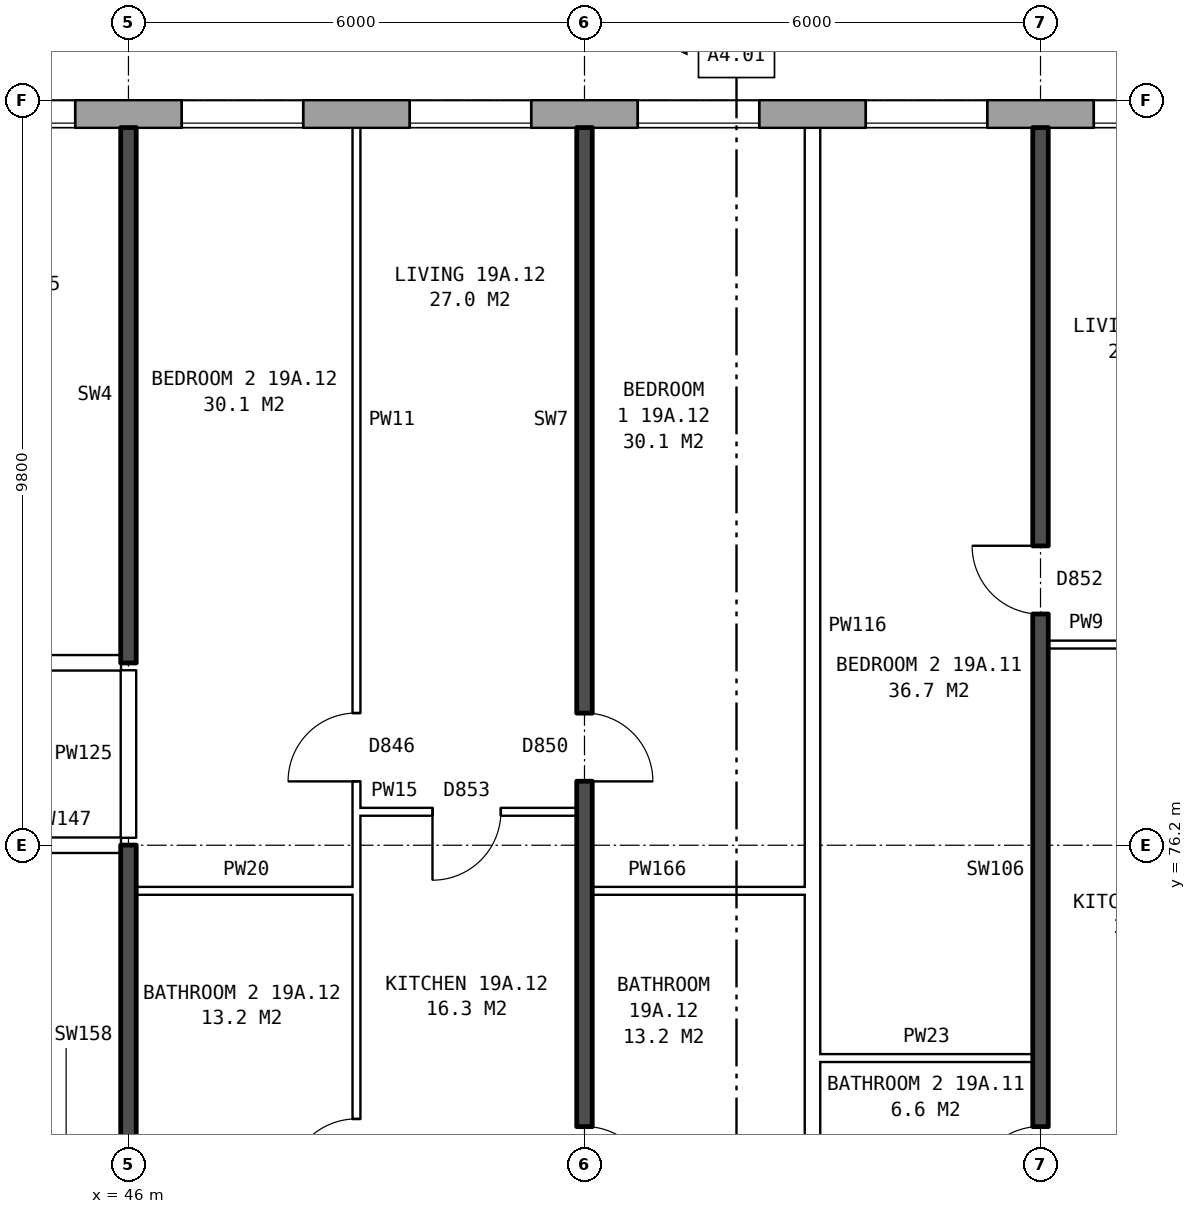
"""IFC4 building model, lengths in metres.
Left out: names, types, materials, properties, quantities, classifications, styles, units other than length and angle.
Written with IfcOpenShell. Run it as: python <this file> out.ifc"""

import sys

from ifc_helpers import new_model, si_unit, direction, frame, frame_2d, origin, place, context, subcontext, project, spatial, rectangle, extrude, element, fill, save


model = new_model("IFC4")
c1 = context("Model", 3, precision=1e-05, world=origin(), true_north=direction((0.0, 1.0)))
c2 = subcontext(c1, "Body", "Model", "MODEL_VIEW")
j1 = project(units=[si_unit("LENGTHUNIT", "METRE"), si_unit("PLANEANGLEUNIT", "RADIAN")], contexts=[c1])
p1 = place(None, origin())
s1 = spatial("IfcSite", under=j1, at=p1, CompositionType="ELEMENT")
p2 = place(p1, origin())
s2 = spatial("IfcBuilding", under=s1, at=p2, CompositionType="ELEMENT")
p3 = place(p2, frame((0.0, 0.0, 71.6)))
s3 = spatial("IfcBuildingStorey", under=s2, at=p3, CompositionType="ELEMENT", Elevation=71.6)
p4 = place(p3, frame((72.925, 85.82, 0.0), z_axis=(0.0, 0.0, 1.0), x_axis=(-1.0, 0.0, 0.0)))
e1 = element("IfcWall", 1, at=p4, inside=s3, PredefinedType="STANDARD", context=c2, shape_type="SweptSolid", body=[
    extrude(rectangle(XDim=46.601, YDim=0.36, at=frame_2d((23.3, 0.0))), origin(), (0.0, 0.0, 1.0), 2.85),
])
p5 = place(p4, frame((0.625, 0.0, 0.8)))
e2 = element("IfcOpeningElement", 2, at=p5, cuts=e1, PredefinedType="OPENING", context=c2, shape_type="SweptSolid", body=[
    extrude(rectangle(XDim=1.6, YDim=1.8, at=frame_2d((0.8, 0.9))), frame((0.0, 0.19, 0.0), z_axis=(0.0, -1.0, 0.0), x_axis=(1.0, 0.0, 0.0)), (0.0, 0.0, 1.0), 0.38),
])
p6 = place(p4, frame((4.625, 0.0, 0.8)))
e3 = element("IfcOpeningElement", 3, at=p6, cuts=e1, PredefinedType="OPENING", context=c2, shape_type="SweptSolid", body=[
    extrude(rectangle(XDim=0.8, YDim=0.9, at=frame_2d((0.4, 0.45))), frame((0.0, 0.19, 0.0), z_axis=(0.0, -1.0, 0.0), x_axis=(1.0, 0.0, 0.0)), (0.0, 0.0, 1.0), 0.38),
])
p7 = place(p4, frame((6.625, 0.0, 0.8)))
e4 = element("IfcOpeningElement", 4, at=p7, cuts=e1, PredefinedType="OPENING", context=c2, shape_type="SweptSolid", body=[
    extrude(rectangle(XDim=1.6, YDim=1.8, at=frame_2d((0.8, 0.9))), frame((0.0, 0.19, 0.0), z_axis=(0.0, -1.0, 0.0), x_axis=(1.0, 0.0, 0.0)), (0.0, 0.0, 1.0), 0.38),
])
p8 = place(p4, frame((9.625, 0.0, 0.8)))
e5 = element("IfcOpeningElement", 5, at=p8, cuts=e1, PredefinedType="OPENING", context=c2, shape_type="SweptSolid", body=[
    extrude(rectangle(XDim=1.6, YDim=1.8, at=frame_2d((0.8, 0.9))), frame((0.0, 0.19, 0.0), z_axis=(0.0, -1.0, 0.0), x_axis=(1.0, 0.0, 0.0)), (0.0, 0.0, 1.0), 0.38),
])
p9 = place(p4, frame((12.625, 0.0, 0.8)))
e6 = element("IfcOpeningElement", 6, at=p9, cuts=e1, PredefinedType="OPENING", context=c2, shape_type="SweptSolid", body=[
    extrude(rectangle(XDim=1.6, YDim=1.8, at=frame_2d((0.8, 0.9))), frame((0.0, 0.19, 0.0), z_axis=(0.0, -1.0, 0.0), x_axis=(1.0, 0.0, 0.0)), (0.0, 0.0, 1.0), 0.38),
])
p10 = place(p4, frame((15.625, 0.0, 0.8)))
e7 = element("IfcOpeningElement", 7, at=p10, cuts=e1, PredefinedType="OPENING", context=c2, shape_type="SweptSolid", body=[
    extrude(rectangle(XDim=1.6, YDim=1.8, at=frame_2d((0.8, 0.9))), frame((0.0, 0.19, 0.0), z_axis=(0.0, -1.0, 0.0), x_axis=(1.0, 0.0, 0.0)), (0.0, 0.0, 1.0), 0.38),
])
p11 = place(p4, frame((18.625, 0.0, 0.8)))
e8 = element("IfcOpeningElement", 8, at=p11, cuts=e1, PredefinedType="OPENING", context=c2, shape_type="SweptSolid", body=[
    extrude(rectangle(XDim=1.6, YDim=1.8, at=frame_2d((0.8, 0.9))), frame((0.0, 0.19, 0.0), z_axis=(0.0, -1.0, 0.0), x_axis=(1.0, 0.0, 0.0)), (0.0, 0.0, 1.0), 0.38),
])
p12 = place(p4, frame((21.625, 0.0, 0.8)))
e9 = element("IfcOpeningElement", 9, at=p12, cuts=e1, PredefinedType="OPENING", context=c2, shape_type="SweptSolid", body=[
    extrude(rectangle(XDim=1.6, YDim=1.8, at=frame_2d((0.8, 0.9))), frame((0.0, 0.19, 0.0), z_axis=(0.0, -1.0, 0.0), x_axis=(1.0, 0.0, 0.0)), (0.0, 0.0, 1.0), 0.38),
])
p13 = place(p4, frame((24.625, 0.0, 0.8)))
e10 = element("IfcOpeningElement", 10, at=p13, cuts=e1, PredefinedType="OPENING", context=c2, shape_type="SweptSolid", body=[
    extrude(rectangle(XDim=1.6, YDim=1.8, at=frame_2d((0.8, 0.9))), frame((0.0, 0.19, 0.0), z_axis=(0.0, -1.0, 0.0), x_axis=(1.0, 0.0, 0.0)), (0.0, 0.0, 1.0), 0.38),
])
p14 = place(p4, frame((27.625, 0.0, 0.8)))
e11 = element("IfcOpeningElement", 11, at=p14, cuts=e1, PredefinedType="OPENING", context=c2, shape_type="SweptSolid", body=[
    extrude(rectangle(XDim=1.6, YDim=1.8, at=frame_2d((0.8, 0.9))), frame((0.0, 0.19, 0.0), z_axis=(0.0, -1.0, 0.0), x_axis=(1.0, 0.0, 0.0)), (0.0, 0.0, 1.0), 0.38),
])
p15 = place(p4, frame((30.625, 0.0, 0.8)))
e12 = element("IfcOpeningElement", 12, at=p15, cuts=e1, PredefinedType="OPENING", context=c2, shape_type="SweptSolid", body=[
    extrude(rectangle(XDim=1.6, YDim=1.8, at=frame_2d((0.8, 0.9))), frame((0.0, 0.19, 0.0), z_axis=(0.0, -1.0, 0.0), x_axis=(1.0, 0.0, 0.0)), (0.0, 0.0, 1.0), 0.38),
])
p16 = place(p4, frame((33.625, 0.0, 0.8)))
e13 = element("IfcOpeningElement", 13, at=p16, cuts=e1, PredefinedType="OPENING", context=c2, shape_type="SweptSolid", body=[
    extrude(rectangle(XDim=1.6, YDim=1.8, at=frame_2d((0.8, 0.9))), frame((0.0, 0.19, 0.0), z_axis=(0.0, -1.0, 0.0), x_axis=(1.0, 0.0, 0.0)), (0.0, 0.0, 1.0), 0.38),
])
p17 = place(p4, frame((36.625, 0.0, 0.8)))
e14 = element("IfcOpeningElement", 14, at=p17, cuts=e1, PredefinedType="OPENING", context=c2, shape_type="SweptSolid", body=[
    extrude(rectangle(XDim=1.6, YDim=1.8, at=frame_2d((0.8, 0.9))), frame((0.0, 0.19, 0.0), z_axis=(0.0, -1.0, 0.0), x_axis=(1.0, 0.0, 0.0)), (0.0, 0.0, 1.0), 0.38),
])
p18 = place(p4, frame((39.625, 0.0, 0.8)))
e15 = element("IfcOpeningElement", 15, at=p18, cuts=e1, PredefinedType="OPENING", context=c2, shape_type="SweptSolid", body=[
    extrude(rectangle(XDim=1.6, YDim=1.8, at=frame_2d((0.8, 0.9))), frame((0.0, 0.19, 0.0), z_axis=(0.0, -1.0, 0.0), x_axis=(1.0, 0.0, 0.0)), (0.0, 0.0, 1.0), 0.38),
])
p19 = place(p4, frame((43.225, 0.0, 1.7)))
e16 = element("IfcOpeningElement", 16, at=p19, cuts=e1, PredefinedType="OPENING", context=c2, shape_type="SweptSolid", body=[
    extrude(rectangle(XDim=0.6, YDim=0.9, at=frame_2d((0.3, 0.45))), frame((0.0, 0.19, 0.0), z_axis=(0.0, -1.0, 0.0), x_axis=(1.0, 0.0, 0.0)), (0.0, 0.0, 1.0), 0.38),
])
p20 = place(p4, frame((5.725, 0.0, 0.8)))
e17 = element("IfcOpeningElement", 17, at=p20, cuts=e1, PredefinedType="OPENING", context=c2, shape_type="SweptSolid", body=[
    extrude(rectangle(XDim=0.6, YDim=1.8, at=frame_2d((0.3, 0.9))), frame((0.0, 0.19, 0.0), z_axis=(0.0, -1.0, 0.0), x_axis=(1.0, 0.0, 0.0)), (0.0, 0.0, 1.0), 0.38),
])
p21 = place(p4, frame((44.125, 0.0, 1.0)))
e18 = element("IfcOpeningElement", 18, at=p21, cuts=e1, PredefinedType="OPENING", context=c2, shape_type="SweptSolid", body=[
    extrude(rectangle(XDim=0.6, YDim=1.5, at=frame_2d((0.3, 0.75))), frame((0.0, 0.19, 0.0), z_axis=(0.0, -1.0, 0.0), x_axis=(1.0, 0.0, 0.0)), (0.0, 0.0, 1.0), 0.38),
])
p22 = place(p3, frame((55.1, 73.4, 0.0), z_axis=(0.0, 0.0, 1.0), x_axis=(1.0, 0.0, 0.0)))
e19 = element("IfcWall", 19, at=p22, inside=s3, PredefinedType="PARTITIONING", context=c2, shape_type="SweptSolid", body=[
    extrude(rectangle(XDim=2.8, YDim=0.1, at=frame_2d((1.4, 0.0))), origin(), (0.0, 0.0, 1.0), 2.85),
])
p23 = place(p3, frame((46.1, 75.6, 0.0), z_axis=(0.0, 0.0, 1.0), x_axis=(1.0, 0.0, 0.0)))
e20 = element("IfcWall", 20, at=p23, inside=s3, PredefinedType="PARTITIONING", context=c2, shape_type="SweptSolid", body=[
    extrude(rectangle(XDim=2.9, YDim=0.1, at=frame_2d((1.45, 0.0))), origin(), (0.0, 0.0, 1.0), 2.85),
])
p24 = place(p3, frame((52.1, 75.6, 0.0), z_axis=(0.0, 0.0, 1.0), x_axis=(1.0, 0.0, 0.0)))
e21 = element("IfcWall", 21, at=p24, inside=s3, PredefinedType="PARTITIONING", context=c2, shape_type="SweptSolid", body=[
    extrude(rectangle(XDim=2.8, YDim=0.1, at=frame_2d((1.4, 0.0))), origin(), (0.0, 0.0, 1.0), 2.85),
])
p25 = place(p3, frame((44.36, 76.2, 0.0), z_axis=(0.0, 0.0, 1.0), x_axis=(1.0, 0.0, 0.0)))
e22 = element("IfcWall", 22, at=p25, inside=s3, PredefinedType="PARTITIONING", context=c2, shape_type="SweptSolid", body=[
    extrude(rectangle(XDim=1.54, YDim=0.2, at=frame_2d((0.77, 0.0))), origin(), (0.0, 0.0, 1.0), 2.85),
])
p26 = place(p3, frame((49.0, 76.64, 0.0), z_axis=(0.0, 0.0, 1.0), x_axis=(1.0, 0.0, 0.0)))
e23 = element("IfcWall", 23, at=p26, inside=s3, PredefinedType="PARTITIONING", context=c2, shape_type="SweptSolid", body=[
    extrude(rectangle(XDim=2.9, YDim=0.1, at=frame_2d((1.45, 0.0))), origin(), (0.0, 0.0, 1.0), 2.85),
])
p27 = place(p26, frame((1.0, 0.0, 0.0)))
e24 = element("IfcOpeningElement", 24, at=p27, cuts=e23, PredefinedType="OPENING", context=c2, shape_type="SweptSolid", body=[
    extrude(rectangle(XDim=0.9, YDim=2.1, at=frame_2d((0.45, 1.05))), frame((0.0, 0.06, 0.0), z_axis=(0.0, -1.0, 0.0), x_axis=(1.0, 0.0, 0.0)), (0.0, 0.0, 1.0), 0.12),
])
p28 = place(p3, frame((23.61, 78.6, 0.0), z_axis=(0.0, 0.0, 1.0), x_axis=(1.0, 0.0, 0.0)))
e25 = element("IfcWall", 25, at=p28, inside=s3, PredefinedType="PARTITIONING", context=c2, shape_type="SweptSolid", body=[
    extrude(rectangle(XDim=22.29, YDim=0.2, at=frame_2d((11.145, 0.0))), origin(), (0.0, 0.0, 1.0), 2.85),
])
p29 = place(p28, frame((18.84, 0.0, 0.0)))
e26 = element("IfcOpeningElement", 26, at=p29, cuts=e25, PredefinedType="OPENING", context=c2, shape_type="SweptSolid", body=[
    extrude(rectangle(XDim=1.0, YDim=2.1, at=frame_2d((0.5, 1.05))), frame((0.0, 0.11, 0.0), z_axis=(0.0, -1.0, 0.0), x_axis=(1.0, 0.0, 0.0)), (0.0, 0.0, 1.0), 0.22),
])
p30 = place(p28, frame((6.89, 0.0, 0.0)))
e27 = element("IfcOpeningElement", 27, at=p30, cuts=e25, PredefinedType="OPENING", context=c2, shape_type="SweptSolid", body=[
    extrude(rectangle(XDim=1.0, YDim=2.1, at=frame_2d((0.5, 1.05))), frame((0.0, 0.11, 0.0), z_axis=(0.0, -1.0, 0.0), x_axis=(1.0, 0.0, 0.0)), (0.0, 0.0, 1.0), 0.22),
])
p31 = place(p3, frame((58.1, 78.84, 0.0), z_axis=(0.0, 0.0, 1.0), x_axis=(1.0, 0.0, 0.0)))
e28 = element("IfcWall", 28, at=p31, inside=s3, PredefinedType="PARTITIONING", context=c2, shape_type="SweptSolid", body=[
    extrude(rectangle(XDim=2.9, YDim=0.1, at=frame_2d((1.45, 0.0))), origin(), (0.0, 0.0, 1.0), 2.85),
])
p32 = place(p31, frame((1.0, 0.0, 0.0)))
e29 = element("IfcOpeningElement", 29, at=p32, cuts=e28, PredefinedType="OPENING", context=c2, shape_type="SweptSolid", body=[
    extrude(rectangle(XDim=0.9, YDim=2.1, at=frame_2d((0.45, 1.05))), frame((0.0, 0.06, 0.0), z_axis=(0.0, -1.0, 0.0), x_axis=(1.0, 0.0, 0.0)), (0.0, 0.0, 1.0), 0.12),
])
p33 = place(p3, frame((46.0, 71.2, 0.0), z_axis=(0.0, 0.0, 1.0), x_axis=(0.0, 1.0, 0.0)))
e30 = element("IfcWall", 30, at=p33, inside=s3, PredefinedType="SOLIDWALL", context=c2, shape_type="SweptSolid", body=[
    extrude(rectangle(XDim=5.0, YDim=0.2, at=frame_2d((2.5, 0.0))), origin(), (0.0, 0.0, 1.0), 2.85),
])
p34 = place(p3, frame((46.0, 76.3, 0.0), z_axis=(0.0, 0.0, 1.0), x_axis=(0.0, 1.0, 0.0)))
e31 = element("IfcWall", 31, at=p34, inside=s3, PredefinedType="PARTITIONING", context=c2, shape_type="SweptSolid", body=[
    extrude(rectangle(XDim=2.2, YDim=0.2, at=frame_2d((1.1, 0.0))), origin(), (0.0, 0.0, 1.0), 2.85),
])
p35 = place(p3, frame((46.0, 78.6, 0.0), z_axis=(0.0, 0.0, 1.0), x_axis=(0.0, 1.0, 0.0)))
e32 = element("IfcWall", 32, at=p35, inside=s3, PredefinedType="SOLIDWALL", context=c2, shape_type="SweptSolid", body=[
    extrude(rectangle(XDim=7.04, YDim=0.2, at=frame_2d((3.52, 0.0))), origin(), (0.0, 0.0, 1.0), 2.85),
])
p36 = place(p3, frame((49.0, 71.3, 0.0), z_axis=(0.0, 0.0, 1.0), x_axis=(0.0, 1.0, 0.0)))
e33 = element("IfcWall", 33, at=p36, inside=s3, PredefinedType="PARTITIONING", context=c2, shape_type="SweptSolid", body=[
    extrude(rectangle(XDim=14.34, YDim=0.1, at=frame_2d((7.17, 0.0))), origin(), (0.0, 0.0, 1.0), 2.85),
])
p37 = place(p36, frame((5.74, 0.0, 0.0)))
e34 = element("IfcOpeningElement", 34, at=p37, cuts=e33, PredefinedType="OPENING", context=c2, shape_type="SweptSolid", body=[
    extrude(rectangle(XDim=0.9, YDim=2.1, at=frame_2d((0.45, 1.05))), frame((0.0, 0.06, 0.0), z_axis=(0.0, -1.0, 0.0), x_axis=(1.0, 0.0, 0.0)), (0.0, 0.0, 1.0), 0.12),
])
p38 = place(p36, frame((0.4, 0.0, 0.0)))
e35 = element("IfcOpeningElement", 35, at=p38, cuts=e33, PredefinedType="OPENING", context=c2, shape_type="SweptSolid", body=[
    extrude(rectangle(XDim=0.9, YDim=2.1, at=frame_2d((0.45, 1.05))), frame((0.0, 0.06, 0.0), z_axis=(0.0, -1.0, 0.0), x_axis=(1.0, 0.0, 0.0)), (0.0, 0.0, 1.0), 0.12),
])
p39 = place(p3, frame((52.0, 71.2, 0.0), z_axis=(0.0, 0.0, 1.0), x_axis=(0.0, 1.0, 0.0)))
e36 = element("IfcWall", 36, at=p39, inside=s3, PredefinedType="SOLIDWALL", context=c2, shape_type="SweptSolid", body=[
    extrude(rectangle(XDim=14.44, YDim=0.2, at=frame_2d((7.22, 0.0))), origin(), (0.0, 0.0, 1.0), 2.85),
])
p40 = place(p39, frame((5.84, 0.0, 0.0)))
e37 = element("IfcOpeningElement", 37, at=p40, cuts=e36, PredefinedType="OPENING", context=c2, shape_type="SweptSolid", body=[
    extrude(rectangle(XDim=0.9, YDim=2.1, at=frame_2d((0.45, 1.05))), frame((0.0, 0.11, 0.0), z_axis=(0.0, -1.0, 0.0), x_axis=(1.0, 0.0, 0.0)), (0.0, 0.0, 1.0), 0.22),
])
p41 = place(p39, frame((0.4, 0.0, 0.0)))
e38 = element("IfcOpeningElement", 38, at=p41, cuts=e36, PredefinedType="OPENING", context=c2, shape_type="SweptSolid", body=[
    extrude(rectangle(XDim=0.9, YDim=2.1, at=frame_2d((0.45, 1.05))), frame((0.0, 0.11, 0.0), z_axis=(0.0, -1.0, 0.0), x_axis=(1.0, 0.0, 0.0)), (0.0, 0.0, 1.0), 0.22),
])
p42 = place(p3, frame((55.0, 71.3, 0.0), z_axis=(0.0, 0.0, 1.0), x_axis=(0.0, 1.0, 0.0)))
e39 = element("IfcWall", 39, at=p42, inside=s3, PredefinedType="PARTITIONING", context=c2, shape_type="SweptSolid", body=[
    extrude(rectangle(XDim=14.34, YDim=0.2, at=frame_2d((7.17, 0.0))), origin(), (0.0, 0.0, 1.0), 2.85),
])
p43 = place(p3, frame((58.0, 71.2, 0.0), z_axis=(0.0, 0.0, 1.0), x_axis=(0.0, 1.0, 0.0)))
e40 = element("IfcWall", 40, at=p43, inside=s3, PredefinedType="SOLIDWALL", context=c2, shape_type="SweptSolid", body=[
    extrude(rectangle(XDim=14.44, YDim=0.2, at=frame_2d((7.22, 0.0))), origin(), (0.0, 0.0, 1.0), 2.85),
])
p44 = place(p43, frame((8.04, 0.0, 0.0)))
e41 = element("IfcOpeningElement", 41, at=p44, cuts=e40, PredefinedType="OPENING", context=c2, shape_type="SweptSolid", body=[
    extrude(rectangle(XDim=0.9, YDim=2.1, at=frame_2d((0.45, 1.05))), frame((0.0, 0.11, 0.0), z_axis=(0.0, -1.0, 0.0), x_axis=(1.0, 0.0, 0.0)), (0.0, 0.0, 1.0), 0.22),
])
p45 = place(p43, frame((0.4, 0.0, 0.0)))
e42 = element("IfcOpeningElement", 42, at=p45, cuts=e40, PredefinedType="OPENING", context=c2, shape_type="SweptSolid", body=[
    extrude(rectangle(XDim=0.9, YDim=2.1, at=frame_2d((0.45, 1.05))), frame((0.0, 0.11, 0.0), z_axis=(0.0, -1.0, 0.0), x_axis=(1.0, 0.0, 0.0)), (0.0, 0.0, 1.0), 0.22),
])
p46 = place(p9, origin())
e43 = element("IfcWindow", 43, at=p46, inside=s3, PartitioningType="SINGLE_PANEL", PredefinedType="WINDOW", context=c2, shape_type="SweptSolid", body=[
    extrude(rectangle(XDim=1.6, YDim=1.8, at=frame_2d((0.8, 0.9))), frame((0.0, 0.15, 0.0), z_axis=(0.0, -1.0, 0.0), x_axis=(1.0, 0.0, 0.0)), (0.0, 0.0, 1.0), 0.06),
])
fill(e6, e43)
p47 = place(p10, origin())
e44 = element("IfcWindow", 44, at=p47, inside=s3, PartitioningType="SINGLE_PANEL", PredefinedType="WINDOW", context=c2, shape_type="SweptSolid", body=[
    extrude(rectangle(XDim=1.6, YDim=1.8, at=frame_2d((0.8, 0.9))), frame((0.0, 0.15, 0.0), z_axis=(0.0, -1.0, 0.0), x_axis=(1.0, 0.0, 0.0)), (0.0, 0.0, 1.0), 0.06),
])
fill(e7, e44)
p48 = place(p11, origin())
e45 = element("IfcWindow", 45, at=p48, inside=s3, PartitioningType="SINGLE_PANEL", PredefinedType="WINDOW", context=c2, shape_type="SweptSolid", body=[
    extrude(rectangle(XDim=1.6, YDim=1.8, at=frame_2d((0.8, 0.9))), frame((0.0, 0.15, 0.0), z_axis=(0.0, -1.0, 0.0), x_axis=(1.0, 0.0, 0.0)), (0.0, 0.0, 1.0), 0.06),
])
fill(e8, e45)
p49 = place(p12, origin())
e46 = element("IfcWindow", 46, at=p49, inside=s3, PartitioningType="SINGLE_PANEL", PredefinedType="WINDOW", context=c2, shape_type="SweptSolid", body=[
    extrude(rectangle(XDim=1.6, YDim=1.8, at=frame_2d((0.8, 0.9))), frame((0.0, 0.15, 0.0), z_axis=(0.0, -1.0, 0.0), x_axis=(1.0, 0.0, 0.0)), (0.0, 0.0, 1.0), 0.06),
])
fill(e9, e46)
p50 = place(p13, origin())
e47 = element("IfcWindow", 47, at=p50, inside=s3, PartitioningType="SINGLE_PANEL", PredefinedType="WINDOW", context=c2, shape_type="SweptSolid", body=[
    extrude(rectangle(XDim=1.6, YDim=1.8, at=frame_2d((0.8, 0.9))), frame((0.0, 0.15, 0.0), z_axis=(0.0, -1.0, 0.0), x_axis=(1.0, 0.0, 0.0)), (0.0, 0.0, 1.0), 0.06),
])
fill(e10, e47)
p51 = place(p14, origin())
e48 = element("IfcWindow", 48, at=p51, inside=s3, PartitioningType="SINGLE_PANEL", PredefinedType="WINDOW", context=c2, shape_type="SweptSolid", body=[
    extrude(rectangle(XDim=1.6, YDim=1.8, at=frame_2d((0.8, 0.9))), frame((0.0, 0.15, 0.0), z_axis=(0.0, -1.0, 0.0), x_axis=(1.0, 0.0, 0.0)), (0.0, 0.0, 1.0), 0.06),
])
fill(e11, e48)
p52 = place(p44, origin())
e49 = element("IfcDoor", 49, at=p52, inside=s3, OperationType="SINGLE_SWING_RIGHT", PredefinedType="DOOR", context=c2, shape_type="SweptSolid", body=[
    extrude(rectangle(XDim=0.9, YDim=2.1, at=frame_2d((0.45, 1.05))), frame((0.0, 0.025, 0.0), z_axis=(0.0, -1.0, 0.0), x_axis=(1.0, 0.0, 0.0)), (0.0, 0.0, 1.0), 0.05),
])
fill(e41, e49)
p53 = place(p45, origin())
e50 = element("IfcDoor", 50, at=p53, inside=s3, OperationType="SINGLE_SWING_LEFT", PredefinedType="DOOR", context=c2, shape_type="SweptSolid", body=[
    extrude(rectangle(XDim=0.9, YDim=2.1, at=frame_2d((0.45, 1.05))), frame((0.0, 0.025, 0.0), z_axis=(0.0, -1.0, 0.0), x_axis=(1.0, 0.0, 0.0)), (0.0, 0.0, 1.0), 0.05),
])
fill(e42, e50)
p54 = place(p40, frame((0.9, 0.0, 0.0), z_axis=(0.0, 0.0, 1.0), x_axis=(-1.0, 0.0, 0.0)))
e51 = element("IfcDoor", 51, at=p54, inside=s3, OperationType="SINGLE_SWING_RIGHT", PredefinedType="DOOR", context=c2, shape_type="SweptSolid", body=[
    extrude(rectangle(XDim=0.9, YDim=2.1, at=frame_2d((0.45, 1.05))), frame((0.0, 0.025, 0.0), z_axis=(0.0, -1.0, 0.0), x_axis=(1.0, 0.0, 0.0)), (0.0, 0.0, 1.0), 0.05),
])
fill(e37, e51)
p55 = place(p37, origin())
e52 = element("IfcDoor", 52, at=p55, inside=s3, OperationType="SINGLE_SWING_LEFT", PredefinedType="DOOR", context=c2, shape_type="SweptSolid", body=[
    extrude(rectangle(XDim=0.9, YDim=2.1, at=frame_2d((0.45, 1.05))), frame((0.0, 0.025, 0.0), z_axis=(0.0, -1.0, 0.0), x_axis=(1.0, 0.0, 0.0)), (0.0, 0.0, 1.0), 0.05),
])
fill(e34, e52)
p56 = place(p27, frame((0.9, 0.0, 0.0), z_axis=(0.0, 0.0, 1.0), x_axis=(-1.0, 0.0, 0.0)))
e53 = element("IfcDoor", 53, at=p56, inside=s3, OperationType="SINGLE_SWING_RIGHT", PredefinedType="DOOR", context=c2, shape_type="SweptSolid", body=[
    extrude(rectangle(XDim=0.9, YDim=2.1, at=frame_2d((0.45, 1.05))), frame((0.0, 0.025, 0.0), z_axis=(0.0, -1.0, 0.0), x_axis=(1.0, 0.0, 0.0)), (0.0, 0.0, 1.0), 0.05),
])
fill(e24, e53)
p57 = place(p41, frame((0.9, 0.0, 0.0), z_axis=(0.0, 0.0, 1.0), x_axis=(-1.0, 0.0, 0.0)))
e54 = element("IfcDoor", 54, at=p57, inside=s3, OperationType="SINGLE_SWING_RIGHT", PredefinedType="DOOR", context=c2, shape_type="SweptSolid", body=[
    extrude(rectangle(XDim=0.9, YDim=2.1, at=frame_2d((0.45, 1.05))), frame((0.0, 0.025, 0.0), z_axis=(0.0, -1.0, 0.0), x_axis=(1.0, 0.0, 0.0)), (0.0, 0.0, 1.0), 0.05),
])
fill(e38, e54)
p58 = place(p38, origin())
e55 = element("IfcDoor", 55, at=p58, inside=s3, OperationType="SINGLE_SWING_LEFT", PredefinedType="DOOR", context=c2, shape_type="SweptSolid", body=[
    extrude(rectangle(XDim=0.9, YDim=2.1, at=frame_2d((0.45, 1.05))), frame((0.0, 0.025, 0.0), z_axis=(0.0, -1.0, 0.0), x_axis=(1.0, 0.0, 0.0)), (0.0, 0.0, 1.0), 0.05),
])
fill(e35, e55)
save(model, sys.argv[1])
